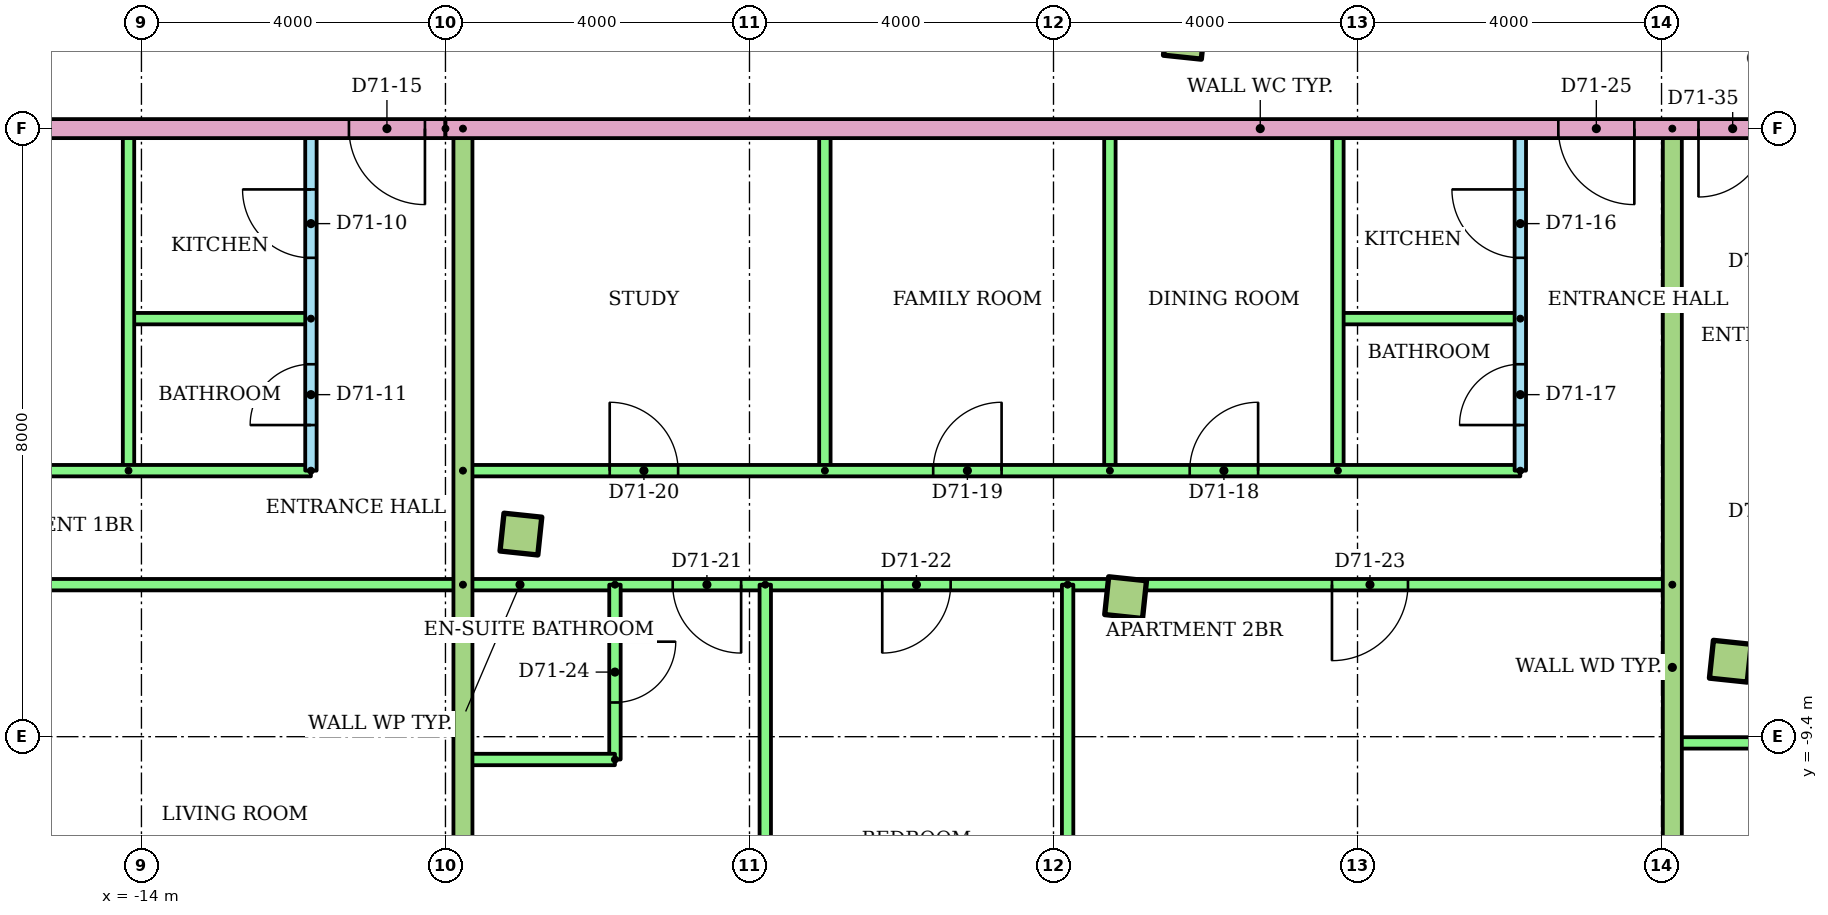
"""IFC4 building model, lengths in metres.
Left out: names, types, materials, properties, quantities, classifications, styles, units other than length and angle.
Written with IfcOpenShell. Run it as: python <this file> out.ifc"""

import sys

from ifc_helpers import new_model, si_unit, direction, frame, frame_2d, origin, origin_2d, place, context, subcontext, project, spatial, rectangle, extrude, element, fill, save


model = new_model("IFC4")
c1 = context("Model", 3, precision=1e-05, world=origin(), true_north=direction((0.0, 1.0)))
c2 = subcontext(c1, "Body", "Model", "MODEL_VIEW")
j1 = project(units=[si_unit("LENGTHUNIT", "METRE"), si_unit("PLANEANGLEUNIT", "RADIAN")], contexts=[c1])
p1 = place(None, origin())
s1 = spatial("IfcSite", under=j1, at=p1, CompositionType="ELEMENT")
p2 = place(p1, origin())
s2 = spatial("IfcBuilding", under=s1, at=p2, CompositionType="ELEMENT")
p3 = place(p2, frame((0.0, 0.0, 272.3)))
s3 = spatial("IfcBuildingStorey", under=s2, at=p3, CompositionType="ELEMENT", Elevation=272.3)
for number, where, z_axis, x_axis in (
    (1, (-9.007, -6.735, 0.0), (0.0, 0.0, 1.0), (0.995, -0.105, 0.0)),
    (2, (-1.051, -7.571, 0.0), (0.0, 0.0, 1.0), (0.995, -0.105, 0.0)),
    (3, (6.905, -8.407, 0.0), (0.0, 0.0, 1.0), (0.995, -0.105, 0.0)),
    (4, (-0.278, -0.211, 0.0), (0.0, 0.0, 1.0), (0.995, -0.105, 0.0)),
):
    element("IfcColumn", number, at=place(p3, frame(where, z_axis=z_axis, x_axis=x_axis)), inside=s3, PredefinedType="COLUMN", context=c2, shape_type="SweptSolid", body=[
        extrude(rectangle(XDim=0.5, YDim=0.5, at=origin_2d()), origin(), (0.0, 0.0, 1.0), 3.2),
    ])
p4 = place(p3, frame((-11.77, -5.9, 0.0), z_axis=(0.0, 0.0, 1.0), x_axis=(0.0, 1.0, 0.0)))
e5 = element("IfcWall", 5, at=p4, inside=s3, PredefinedType="PARTITIONING", context=c2, shape_type="SweptSolid", body=[
    extrude(rectangle(XDim=4.5, YDim=0.15, at=frame_2d((2.25, 0.0))), origin(), (0.0, 0.0, 1.0), 2.4),
])
p5 = place(p4, frame((2.8, 0.0, 0.0)))
e6 = element("IfcOpeningElement", 6, at=p5, cuts=e5, PredefinedType="OPENING", context=c2, shape_type="SweptSolid", body=[
    extrude(rectangle(XDim=0.9, YDim=2.1, at=frame_2d((0.45, 1.05))), frame((0.0, 0.085, 0.0), z_axis=(0.0, -1.0, 0.0), x_axis=(1.0, 0.0, 0.0)), (0.0, 0.0, 1.0), 0.17),
])
p6 = place(p4, frame((0.6, 0.0, 0.0)))
e7 = element("IfcOpeningElement", 7, at=p6, cuts=e5, PredefinedType="OPENING", context=c2, shape_type="SweptSolid", body=[
    extrude(rectangle(XDim=0.8, YDim=2.1, at=frame_2d((0.4, 1.05))), frame((0.0, 0.085, 0.0), z_axis=(0.0, -1.0, 0.0), x_axis=(1.0, 0.0, 0.0)), (0.0, 0.0, 1.0), 0.17),
])
p7 = place(p3, frame((-11.77, -3.9, 0.0), z_axis=(0.0, 0.0, 1.0), x_axis=(-1.0, 0.0, 0.0)))
e8 = element("IfcWall", 8, at=p7, inside=s3, PredefinedType="PARTITIONING", context=c2, shape_type="SweptSolid", body=[
    extrude(rectangle(XDim=2.4, YDim=0.15, at=frame_2d((1.2, 0.0))), origin(), (0.0, 0.0, 1.0), 2.4),
])
p8 = place(p3, frame((-14.17, -5.9, 0.0), z_axis=(0.0, 0.0, 1.0), x_axis=(0.0, 1.0, 0.0)))
e9 = element("IfcWall", 9, at=p8, inside=s3, PredefinedType="PARTITIONING", context=c2, shape_type="SweptSolid", body=[
    extrude(rectangle(XDim=4.5, YDim=0.15, at=frame_2d((2.25, 0.0))), origin(), (0.0, 0.0, 1.0), 2.4),
])
p9 = place(p3, frame((-24.023, -5.9, 0.0)))
e10 = element("IfcWall", 10, at=p9, inside=s3, PredefinedType="PARTITIONING", context=c2, shape_type="SweptSolid", body=[
    extrude(rectangle(XDim=12.253, YDim=0.15, at=frame_2d((6.127, 0.0))), origin(), (0.0, 0.0, 1.0), 2.4),
])
p10 = place(p9, frame((7.465, 0.0, 0.0)))
e11 = element("IfcOpeningElement", 11, at=p10, cuts=e10, PredefinedType="OPENING", context=c2, shape_type="SweptSolid", body=[
    extrude(rectangle(XDim=0.9, YDim=2.1, at=frame_2d((0.45, 1.05))), frame((0.0, 0.085, 0.0), z_axis=(0.0, -1.0, 0.0), x_axis=(1.0, 0.0, 0.0)), (0.0, 0.0, 1.0), 0.17),
])
p11 = place(p9, frame((2.494, 0.0, 0.0)))
e12 = element("IfcOpeningElement", 12, at=p11, cuts=e10, PredefinedType="OPENING", context=c2, shape_type="SweptSolid", body=[
    extrude(rectangle(XDim=0.9, YDim=2.1, at=frame_2d((0.45, 1.05))), frame((0.0, 0.085, 0.0), z_axis=(0.0, -1.0, 0.0), x_axis=(1.0, 0.0, 0.0)), (0.0, 0.0, 1.0), 0.17),
])
p12 = place(p3, frame((-9.77, -7.4, 0.0), z_axis=(0.0, 0.0, 1.0), x_axis=(-1.0, 0.0, 0.0)))
e13 = element("IfcWall", 13, at=p12, inside=s3, PredefinedType="PARTITIONING", context=c2, shape_type="SweptSolid", body=[
    extrude(rectangle(XDim=14.411, YDim=0.15, at=frame_2d((7.206, 0.0))), origin(), (0.0, 0.0, 1.0), 2.4),
])
p13 = place(p12, frame((5.789, 0.0, 0.0)))
e14 = element("IfcOpeningElement", 14, at=p13, cuts=e13, PredefinedType="OPENING", context=c2, shape_type="SweptSolid", body=[
    extrude(rectangle(XDim=1.0, YDim=2.1, at=frame_2d((0.5, 1.05))), frame((0.0, 0.085, 0.0), z_axis=(0.0, -1.0, 0.0), x_axis=(1.0, 0.0, 0.0)), (0.0, 0.0, 1.0), 0.17),
])
p14 = place(p3, frame((4.142, -5.9, 0.0), z_axis=(0.0, 0.0, 1.0), x_axis=(0.0, 1.0, 0.0)))
e15 = element("IfcWall", 15, at=p14, inside=s3, PredefinedType="PARTITIONING", context=c2, shape_type="SweptSolid", body=[
    extrude(rectangle(XDim=4.5, YDim=0.15, at=frame_2d((2.25, 0.0))), origin(), (0.0, 0.0, 1.0), 2.4),
])
p15 = place(p14, frame((2.8, 0.0, 0.0)))
e16 = element("IfcOpeningElement", 16, at=p15, cuts=e15, PredefinedType="OPENING", context=c2, shape_type="SweptSolid", body=[
    extrude(rectangle(XDim=0.9, YDim=2.1, at=frame_2d((0.45, 1.05))), frame((0.0, 0.085, 0.0), z_axis=(0.0, -1.0, 0.0), x_axis=(1.0, 0.0, 0.0)), (0.0, 0.0, 1.0), 0.17),
])
p16 = place(p14, frame((0.6, 0.0, 0.0)))
e17 = element("IfcOpeningElement", 17, at=p16, cuts=e15, PredefinedType="OPENING", context=c2, shape_type="SweptSolid", body=[
    extrude(rectangle(XDim=0.8, YDim=2.1, at=frame_2d((0.4, 1.05))), frame((0.0, 0.085, 0.0), z_axis=(0.0, -1.0, 0.0), x_axis=(1.0, 0.0, 0.0)), (0.0, 0.0, 1.0), 0.17),
])
p17 = place(p3, frame((4.142, -3.9, 0.0), z_axis=(0.0, 0.0, 1.0), x_axis=(-1.0, 0.0, 0.0)))
e18 = element("IfcWall", 18, at=p17, inside=s3, PredefinedType="PARTITIONING", context=c2, shape_type="SweptSolid", body=[
    extrude(rectangle(XDim=2.4, YDim=0.15, at=frame_2d((1.2, 0.0))), origin(), (0.0, 0.0, 1.0), 2.4),
])
for number, where, z_axis, x_axis in (
    (19, (1.742, -5.9, 0.0), (0.0, 0.0, 1.0), (0.0, 1.0, 0.0)),
    (20, (-1.258, -5.9, 0.0), (0.0, 0.0, 1.0), (0.0, 1.0, 0.0)),
    (21, (-5.008, -5.9, 0.0), (0.0, 0.0, 1.0), (0.0, 1.0, 0.0)),
):
    element("IfcWall", number, at=place(p3, frame(where, z_axis=z_axis, x_axis=x_axis)), inside=s3, PredefinedType="PARTITIONING", context=c2, shape_type="SweptSolid", body=[
        extrude(rectangle(XDim=4.5, YDim=0.15, at=frame_2d((2.25, 0.0))), origin(), (0.0, 0.0, 1.0), 2.4),
    ])
p18 = place(p3, frame((-9.77, -5.9, 0.0)))
e22 = element("IfcWall", 22, at=p18, inside=s3, PredefinedType="PARTITIONING", context=c2, shape_type="SweptSolid", body=[
    extrude(rectangle(XDim=13.912, YDim=0.15, at=frame_2d((6.956, 0.0))), origin(), (0.0, 0.0, 1.0), 2.4),
])
p19 = place(p18, frame((9.562, 0.0, 0.0)))
e23 = element("IfcOpeningElement", 23, at=p19, cuts=e22, PredefinedType="OPENING", context=c2, shape_type="SweptSolid", body=[
    extrude(rectangle(XDim=0.9, YDim=2.1, at=frame_2d((0.45, 1.05))), frame((0.0, 0.085, 0.0), z_axis=(0.0, -1.0, 0.0), x_axis=(1.0, 0.0, 0.0)), (0.0, 0.0, 1.0), 0.17),
])
p20 = place(p18, frame((6.187, 0.0, 0.0)))
e24 = element("IfcOpeningElement", 24, at=p20, cuts=e22, PredefinedType="OPENING", context=c2, shape_type="SweptSolid", body=[
    extrude(rectangle(XDim=0.9, YDim=2.1, at=frame_2d((0.45, 1.05))), frame((0.0, 0.085, 0.0), z_axis=(0.0, -1.0, 0.0), x_axis=(1.0, 0.0, 0.0)), (0.0, 0.0, 1.0), 0.17),
])
p21 = place(p18, frame((1.931, 0.0, 0.0)))
e25 = element("IfcOpeningElement", 25, at=p21, cuts=e22, PredefinedType="OPENING", context=c2, shape_type="SweptSolid", body=[
    extrude(rectangle(XDim=0.9, YDim=2.1, at=frame_2d((0.45, 1.05))), frame((0.0, 0.085, 0.0), z_axis=(0.0, -1.0, 0.0), x_axis=(1.0, 0.0, 0.0)), (0.0, 0.0, 1.0), 0.17),
])
p22 = place(p3, frame((6.142, -7.4, 0.0), z_axis=(0.0, 0.0, 1.0), x_axis=(-1.0, 0.0, 0.0)))
e26 = element("IfcWall", 26, at=p22, inside=s3, PredefinedType="PARTITIONING", context=c2, shape_type="SweptSolid", body=[
    extrude(rectangle(XDim=15.912, YDim=0.15, at=frame_2d((7.956, 0.0))), origin(), (0.0, 0.0, 1.0), 2.4),
])
p23 = place(p22, frame((12.252, 0.0, 0.0)))
e27 = element("IfcOpeningElement", 27, at=p23, cuts=e26, PredefinedType="OPENING", context=c2, shape_type="SweptSolid", body=[
    extrude(rectangle(XDim=0.9, YDim=2.1, at=frame_2d((0.45, 1.05))), frame((0.0, 0.085, 0.0), z_axis=(0.0, -1.0, 0.0), x_axis=(1.0, 0.0, 0.0)), (0.0, 0.0, 1.0), 0.17),
])
p24 = place(p22, frame((9.495, 0.0, 0.0)))
e28 = element("IfcOpeningElement", 28, at=p24, cuts=e26, PredefinedType="OPENING", context=c2, shape_type="SweptSolid", body=[
    extrude(rectangle(XDim=0.9, YDim=2.1, at=frame_2d((0.45, 1.05))), frame((0.0, 0.085, 0.0), z_axis=(0.0, -1.0, 0.0), x_axis=(1.0, 0.0, 0.0)), (0.0, 0.0, 1.0), 0.17),
])
p25 = place(p22, frame((3.478, 0.0, 0.0)))
e29 = element("IfcOpeningElement", 29, at=p25, cuts=e26, PredefinedType="OPENING", context=c2, shape_type="SweptSolid", body=[
    extrude(rectangle(XDim=1.0, YDim=2.1, at=frame_2d((0.5, 1.05))), frame((0.0, 0.085, 0.0), z_axis=(0.0, -1.0, 0.0), x_axis=(1.0, 0.0, 0.0)), (0.0, 0.0, 1.0), 0.17),
])
p26 = place(p3, frame((-5.792, -7.4, 0.0), z_axis=(0.0, 0.0, 1.0), x_axis=(0.0, -1.0, 0.0)))
e30 = element("IfcWall", 30, at=p26, inside=s3, PredefinedType="PARTITIONING", context=c2, shape_type="SweptSolid", body=[
    extrude(rectangle(XDim=6.933, YDim=0.15, at=frame_2d((3.467, 0.0))), origin(), (0.0, 0.0, 1.0), 2.4),
])
p27 = place(p3, frame((-1.814, -7.4, 0.0), z_axis=(0.0, 0.0, 1.0), x_axis=(0.0, -1.0, 0.0)))
e31 = element("IfcWall", 31, at=p27, inside=s3, PredefinedType="PARTITIONING", context=c2, shape_type="SweptSolid", body=[
    extrude(rectangle(XDim=7.341, YDim=0.15, at=frame_2d((3.67, 0.0))), origin(), (0.0, 0.0, 1.0), 2.4),
])
p28 = place(p3, frame((-7.77, -7.4, 0.0), z_axis=(0.0, 0.0, 1.0), x_axis=(0.0, -1.0, 0.0)))
e32 = element("IfcWall", 32, at=p28, inside=s3, PredefinedType="PARTITIONING", context=c2, shape_type="SweptSolid", body=[
    extrude(rectangle(XDim=2.3, YDim=0.15, at=frame_2d((1.15, 0.0))), origin(), (0.0, 0.0, 1.0), 2.4),
])
p29 = place(p28, frame((0.75, 0.0, 0.0)))
e33 = element("IfcOpeningElement", 33, at=p29, cuts=e32, PredefinedType="OPENING", context=c2, shape_type="SweptSolid", body=[
    extrude(rectangle(XDim=0.8, YDim=2.1, at=frame_2d((0.4, 1.05))), frame((0.0, 0.085, 0.0), z_axis=(0.0, -1.0, 0.0), x_axis=(1.0, 0.0, 0.0)), (0.0, 0.0, 1.0), 0.17),
])
p30 = place(p3, frame((-7.77, -9.7, 0.0), z_axis=(0.0, 0.0, 1.0), x_axis=(-1.0, 0.0, 0.0)))
e34 = element("IfcWall", 34, at=p30, inside=s3, PredefinedType="PARTITIONING", context=c2, shape_type="SweptSolid", body=[
    extrude(rectangle(XDim=2.0, YDim=0.15, at=frame_2d((1.0, 0.0))), origin(), (0.0, 0.0, 1.0), 2.4),
])
p31 = place(p3, frame((-9.77, -1.4, 0.0), z_axis=(0.0, 0.0, 1.0), x_axis=(0.0, -1.0, 0.0)))
e35 = element("IfcWall", 35, at=p31, inside=s3, PredefinedType="PARTITIONING", context=c2, shape_type="SweptSolid", body=[
    extrude(rectangle(XDim=12.504, YDim=0.25, at=frame_2d((6.252, 0.0))), origin(), (0.0, 0.0, 1.0), 2.4),
])
p32 = place(p3, frame((29.94, -9.482, 0.0), z_axis=(0.0, 0.0, 1.0), x_axis=(-1.0, 0.0, 0.0)))
e36 = element("IfcWall", 36, at=p32, inside=s3, PredefinedType="PARTITIONING", context=c2, shape_type="SweptSolid", body=[
    extrude(rectangle(XDim=23.798, YDim=0.15, at=frame_2d((11.899, 0.0))), origin(), (0.0, 0.0, 1.0), 2.4),
])
p33 = place(p32, frame((19.32, 0.0, 0.0)))
e37 = element("IfcOpeningElement", 37, at=p33, cuts=e36, PredefinedType="OPENING", context=c2, shape_type="SweptSolid", body=[
    extrude(rectangle(XDim=1.0, YDim=2.1, at=frame_2d((0.5, 1.05))), frame((0.0, 0.085, 0.0), z_axis=(0.0, -1.0, 0.0), x_axis=(1.0, 0.0, 0.0)), (0.0, 0.0, 1.0), 0.17),
])
p34 = place(p32, frame((13.403, 0.0, 0.0)))
e38 = element("IfcOpeningElement", 38, at=p34, cuts=e36, PredefinedType="OPENING", context=c2, shape_type="SweptSolid", body=[
    extrude(rectangle(XDim=0.9, YDim=2.1, at=frame_2d((0.45, 1.05))), frame((0.0, 0.085, 0.0), z_axis=(0.0, -1.0, 0.0), x_axis=(1.0, 0.0, 0.0)), (0.0, 0.0, 1.0), 0.17),
])
p35 = place(p32, frame((9.425, 0.0, 0.0)))
e39 = element("IfcOpeningElement", 39, at=p35, cuts=e36, PredefinedType="OPENING", context=c2, shape_type="SweptSolid", body=[
    extrude(rectangle(XDim=0.9, YDim=2.1, at=frame_2d((0.45, 1.05))), frame((0.0, 0.085, 0.0), z_axis=(0.0, -1.0, 0.0), x_axis=(1.0, 0.0, 0.0)), (0.0, 0.0, 1.0), 0.17),
])
p36 = place(p32, frame((2.434, 0.0, 0.0)))
e40 = element("IfcOpeningElement", 40, at=p36, cuts=e36, PredefinedType="OPENING", context=c2, shape_type="SweptSolid", body=[
    extrude(rectangle(XDim=0.9, YDim=2.1, at=frame_2d((0.45, 1.05))), frame((0.0, 0.085, 0.0), z_axis=(0.0, -1.0, 0.0), x_axis=(1.0, 0.0, 0.0)), (0.0, 0.0, 1.0), 0.17),
])
p37 = place(p3, frame((6.142, -1.4, 0.0), z_axis=(0.0, 0.0, 1.0), x_axis=(0.0, -1.0, 0.0)))
e41 = element("IfcWall", 41, at=p37, inside=s3, PredefinedType="PARTITIONING", context=c2, shape_type="SweptSolid", body=[
    extrude(rectangle(XDim=14.177, YDim=0.25, at=frame_2d((7.088, 0.0))), origin(), (0.0, 0.0, 1.0), 2.4),
])
p38 = place(p3, frame((-10.0, -1.4, 0.0), z_axis=(0.0, 0.0, 1.0), x_axis=(-1.0, 0.0, 0.0)))
e42 = element("IfcWall", 42, at=p38, inside=s3, PredefinedType="PARTITIONING", context=c2, shape_type="SweptSolid", body=[
    extrude(rectangle(XDim=13.56, YDim=0.25, at=frame_2d((6.78, 0.0))), origin(), (0.0, 0.0, 1.0), 2.4),
])
p39 = place(p38, frame((0.27, 0.0, 0.0)))
e43 = element("IfcOpeningElement", 43, at=p39, cuts=e42, PredefinedType="OPENING", context=c2, shape_type="SweptSolid", body=[
    extrude(rectangle(XDim=1.0, YDim=2.1, at=frame_2d((0.5, 1.05))), frame((0.0, 0.135, 0.0), z_axis=(0.0, -1.0, 0.0), x_axis=(1.0, 0.0, 0.0)), (0.0, 0.0, 1.0), 0.27),
])
p40 = place(p3, frame((10.0, -1.4, 0.0), z_axis=(0.0, 0.0, 1.0), x_axis=(-1.0, 0.0, 0.0)))
e44 = element("IfcWall", 44, at=p40, inside=s3, PredefinedType="PARTITIONING", context=c2, shape_type="SweptSolid", body=[
    extrude(rectangle(XDim=20.0, YDim=0.25, at=frame_2d((10.0, 0.0))), origin(), (0.0, 0.0, 1.0), 2.4),
])
p41 = place(p40, frame((4.358, 0.0, 0.0)))
e45 = element("IfcOpeningElement", 45, at=p41, cuts=e44, PredefinedType="OPENING", context=c2, shape_type="SweptSolid", body=[
    extrude(rectangle(XDim=1.0, YDim=2.1, at=frame_2d((0.5, 1.05))), frame((0.0, 0.135, 0.0), z_axis=(0.0, -1.0, 0.0), x_axis=(1.0, 0.0, 0.0)), (0.0, 0.0, 1.0), 0.27),
])
p42 = place(p40, frame((2.614, 0.0, 0.0)))
e46 = element("IfcOpeningElement", 46, at=p42, cuts=e44, PredefinedType="OPENING", context=c2, shape_type="SweptSolid", body=[
    extrude(rectangle(XDim=0.9, YDim=2.1, at=frame_2d((0.45, 1.05))), frame((0.0, 0.135, 0.0), z_axis=(0.0, -1.0, 0.0), x_axis=(1.0, 0.0, 0.0)), (0.0, 0.0, 1.0), 0.27),
])
p43 = place(p5, origin())
e47 = element("IfcDoor", 47, at=p43, inside=s3, OperationType="SINGLE_SWING_RIGHT", PredefinedType="DOOR", context=c2, shape_type="SweptSolid", body=[
    extrude(rectangle(XDim=0.9, YDim=2.1, at=frame_2d((0.45, 1.05))), frame((0.0, 0.025, 0.0), z_axis=(0.0, -1.0, 0.0), x_axis=(1.0, 0.0, 0.0)), (0.0, 0.0, 1.0), 0.05),
])
fill(e6, e47)
p44 = place(p6, origin())
e48 = element("IfcDoor", 48, at=p44, inside=s3, OperationType="SINGLE_SWING_LEFT", PredefinedType="DOOR", context=c2, shape_type="SweptSolid", body=[
    extrude(rectangle(XDim=0.8, YDim=2.1, at=frame_2d((0.4, 1.05))), frame((0.0, 0.025, 0.0), z_axis=(0.0, -1.0, 0.0), x_axis=(1.0, 0.0, 0.0)), (0.0, 0.0, 1.0), 0.05),
])
fill(e7, e48)
p45 = place(p39, origin())
e49 = element("IfcDoor", 49, at=p45, inside=s3, OperationType="SINGLE_SWING_LEFT", PredefinedType="DOOR", context=c2, shape_type="SweptSolid", body=[
    extrude(rectangle(XDim=1.0, YDim=2.1, at=frame_2d((0.5, 1.05))), frame((0.0, 0.025, 0.0), z_axis=(0.0, -1.0, 0.0), x_axis=(1.0, 0.0, 0.0)), (0.0, 0.0, 1.0), 0.05),
])
fill(e43, e49)
p46 = place(p15, origin())
e50 = element("IfcDoor", 50, at=p46, inside=s3, OperationType="SINGLE_SWING_RIGHT", PredefinedType="DOOR", context=c2, shape_type="SweptSolid", body=[
    extrude(rectangle(XDim=0.9, YDim=2.1, at=frame_2d((0.45, 1.05))), frame((0.0, 0.025, 0.0), z_axis=(0.0, -1.0, 0.0), x_axis=(1.0, 0.0, 0.0)), (0.0, 0.0, 1.0), 0.05),
])
fill(e16, e50)
p47 = place(p16, origin())
e51 = element("IfcDoor", 51, at=p47, inside=s3, OperationType="SINGLE_SWING_LEFT", PredefinedType="DOOR", context=c2, shape_type="SweptSolid", body=[
    extrude(rectangle(XDim=0.8, YDim=2.1, at=frame_2d((0.4, 1.05))), frame((0.0, 0.025, 0.0), z_axis=(0.0, -1.0, 0.0), x_axis=(1.0, 0.0, 0.0)), (0.0, 0.0, 1.0), 0.05),
])
fill(e17, e51)
p48 = place(p19, origin())
e52 = element("IfcDoor", 52, at=p48, inside=s3, OperationType="SINGLE_SWING_RIGHT", PredefinedType="DOOR", context=c2, shape_type="SweptSolid", body=[
    extrude(rectangle(XDim=0.9, YDim=2.1, at=frame_2d((0.45, 1.05))), frame((0.0, 0.025, 0.0), z_axis=(0.0, -1.0, 0.0), x_axis=(1.0, 0.0, 0.0)), (0.0, 0.0, 1.0), 0.05),
])
fill(e23, e52)
p49 = place(p20, origin())
e53 = element("IfcDoor", 53, at=p49, inside=s3, OperationType="SINGLE_SWING_RIGHT", PredefinedType="DOOR", context=c2, shape_type="SweptSolid", body=[
    extrude(rectangle(XDim=0.9, YDim=2.1, at=frame_2d((0.45, 1.05))), frame((0.0, 0.025, 0.0), z_axis=(0.0, -1.0, 0.0), x_axis=(1.0, 0.0, 0.0)), (0.0, 0.0, 1.0), 0.05),
])
fill(e24, e53)
p50 = place(p21, origin())
e54 = element("IfcDoor", 54, at=p50, inside=s3, OperationType="SINGLE_SWING_LEFT", PredefinedType="DOOR", context=c2, shape_type="SweptSolid", body=[
    extrude(rectangle(XDim=0.9, YDim=2.1, at=frame_2d((0.45, 1.05))), frame((0.0, 0.025, 0.0), z_axis=(0.0, -1.0, 0.0), x_axis=(1.0, 0.0, 0.0)), (0.0, 0.0, 1.0), 0.05),
])
fill(e25, e54)
p51 = place(p23, origin())
e55 = element("IfcDoor", 55, at=p51, inside=s3, OperationType="SINGLE_SWING_LEFT", PredefinedType="DOOR", context=c2, shape_type="SweptSolid", body=[
    extrude(rectangle(XDim=0.9, YDim=2.1, at=frame_2d((0.45, 1.05))), frame((0.0, 0.025, 0.0), z_axis=(0.0, -1.0, 0.0), x_axis=(1.0, 0.0, 0.0)), (0.0, 0.0, 1.0), 0.05),
])
fill(e27, e55)
p52 = place(p24, origin())
e56 = element("IfcDoor", 56, at=p52, inside=s3, OperationType="SINGLE_SWING_RIGHT", PredefinedType="DOOR", context=c2, shape_type="SweptSolid", body=[
    extrude(rectangle(XDim=0.9, YDim=2.1, at=frame_2d((0.45, 1.05))), frame((0.0, 0.025, 0.0), z_axis=(0.0, -1.0, 0.0), x_axis=(1.0, 0.0, 0.0)), (0.0, 0.0, 1.0), 0.05),
])
fill(e28, e56)
p53 = place(p25, origin())
e57 = element("IfcDoor", 57, at=p53, inside=s3, OperationType="SINGLE_SWING_RIGHT", PredefinedType="DOOR", context=c2, shape_type="SweptSolid", body=[
    extrude(rectangle(XDim=1.0, YDim=2.1, at=frame_2d((0.5, 1.05))), frame((0.0, 0.025, 0.0), z_axis=(0.0, -1.0, 0.0), x_axis=(1.0, 0.0, 0.0)), (0.0, 0.0, 1.0), 0.05),
])
fill(e29, e57)
p54 = place(p29, origin())
e58 = element("IfcDoor", 58, at=p54, inside=s3, OperationType="SINGLE_SWING_LEFT", PredefinedType="DOOR", context=c2, shape_type="SweptSolid", body=[
    extrude(rectangle(XDim=0.8, YDim=2.1, at=frame_2d((0.4, 1.05))), frame((0.0, 0.025, 0.0), z_axis=(0.0, -1.0, 0.0), x_axis=(1.0, 0.0, 0.0)), (0.0, 0.0, 1.0), 0.05),
])
fill(e33, e58)
p55 = place(p41, origin())
e59 = element("IfcDoor", 59, at=p55, inside=s3, OperationType="SINGLE_SWING_LEFT", PredefinedType="DOOR", context=c2, shape_type="SweptSolid", body=[
    extrude(rectangle(XDim=1.0, YDim=2.1, at=frame_2d((0.5, 1.05))), frame((0.0, 0.025, 0.0), z_axis=(0.0, -1.0, 0.0), x_axis=(1.0, 0.0, 0.0)), (0.0, 0.0, 1.0), 0.05),
])
fill(e45, e59)
p56 = place(p42, origin())
e60 = element("IfcDoor", 60, at=p56, inside=s3, OperationType="SINGLE_SWING_RIGHT", PredefinedType="DOOR", context=c2, shape_type="SweptSolid", body=[
    extrude(rectangle(XDim=0.9, YDim=2.1, at=frame_2d((0.45, 1.05))), frame((0.0, 0.025, 0.0), z_axis=(0.0, -1.0, 0.0), x_axis=(1.0, 0.0, 0.0)), (0.0, 0.0, 1.0), 0.05),
])
fill(e46, e60)
save(model, sys.argv[1])
